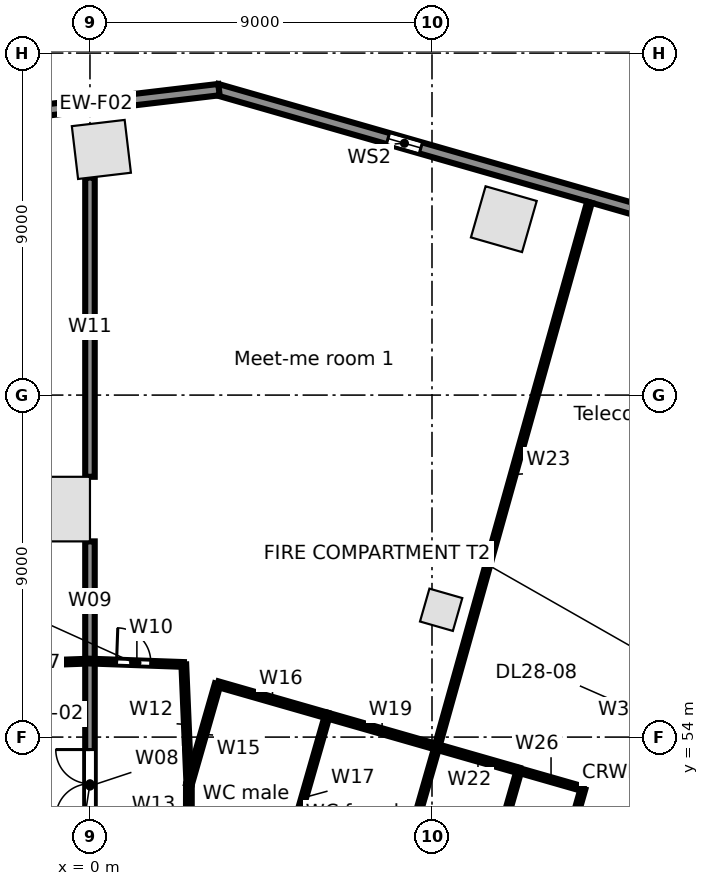
"""IFC4 building model, lengths in metres.
Left out: names, types, materials, properties, quantities, classifications, styles, units other than length and angle.
Written with IfcOpenShell. Run it as: python <this file> out.ifc"""

import sys

from ifc_helpers import new_model, si_unit, direction, frame, frame_2d, origin, origin_2d, place, context, subcontext, project, spatial, rectangle, extrude, element, fill, save


model = new_model("IFC4")
c1 = context("Model", 3, precision=1e-05, world=origin(), true_north=direction((0.0, 1.0)))
c2 = subcontext(c1, "Body", "Model", "MODEL_VIEW")
j1 = project(units=[si_unit("LENGTHUNIT", "METRE"), si_unit("PLANEANGLEUNIT", "RADIAN")], contexts=[c1])
p1 = place(None, origin())
s1 = spatial("IfcSite", under=j1, at=p1, CompositionType="ELEMENT")
p2 = place(p1, origin())
s2 = spatial("IfcBuilding", under=s1, at=p2, CompositionType="ELEMENT")
p3 = place(p2, frame((0.0, 0.0, 136.7)))
s3 = spatial("IfcBuildingStorey", under=s2, at=p3, CompositionType="ELEMENT", Elevation=136.7)
for number, where, z_axis, x_axis in (
    (1, (10.89, 67.629, 0.0), (0.0, 0.0, 1.0), (-0.961, 0.276, 0.0)),
    (2, (0.3, 69.464, 0.0), (0.0, 0.0, 1.0), (-0.993, -0.118, 0.0)),
):
    element("IfcColumn", number, at=place(p3, frame(where, z_axis=z_axis, x_axis=x_axis)), inside=s3, PredefinedType="COLUMN", context=c2, shape_type="SweptSolid", body=[
        extrude(rectangle(XDim=1.4, YDim=1.4, at=origin_2d()), origin(), (0.0, 0.0, 1.0), 4.4),
    ])
p4 = place(p3, frame((-0.85, 60.0, 0.0), z_axis=(0.0, 0.0, 1.0), x_axis=(0.0, 1.0, 0.0)))
e3 = element("IfcColumn", 3, at=p4, inside=s3, PredefinedType="COLUMN", context=c2, shape_type="SweptSolid", body=[
    extrude(rectangle(XDim=1.7, YDim=1.7, at=origin_2d()), origin(), (0.0, 0.0, 1.0), 4.4),
])
p5 = place(p3, frame((9.241, 57.35, 0.0), z_axis=(0.0, 0.0, 1.0), x_axis=(0.961261695938, -0.275637355817, 0.0)))
e4 = element("IfcColumn", 4, at=p5, inside=s3, PredefinedType="COLUMN", context=c2, shape_type="SweptSolid", body=[
    extrude(rectangle(XDim=0.9, YDim=0.9, at=origin_2d()), origin(), (0.0, 0.0, 1.0), 4.4),
])
p6 = place(p3, frame((3.335, 71.044, 0.0), z_axis=(0.0, 0.0, 1.0), x_axis=(0.961260130989, -0.275642813387, 0.0)))
e5 = element("IfcWall", 5, at=p6, inside=s3, PredefinedType="STANDARD", context=c2, shape_type="SweptSolid", body=[
    extrude(rectangle(XDim=32.741, YDim=0.3, at=frame_2d((16.371, 0.0))), origin(), (0.0, 0.0, 1.0), 4.08),
])
p7 = place(p6, frame((29.207, 0.0, 0.6)))
e6 = element("IfcOpeningElement", 6, at=p7, cuts=e5, PredefinedType="OPENING", context=c2, shape_type="SweptSolid", body=[
    extrude(rectangle(XDim=0.9, YDim=2.8, at=frame_2d((0.45, 1.4))), frame((0.0, 0.16, 0.0), z_axis=(0.0, -1.0, 0.0), x_axis=(1.0, 0.0, 0.0)), (0.0, 0.0, 1.0), 0.32),
])
p8 = place(p6, frame((21.034, 0.0, 0.6)))
e7 = element("IfcOpeningElement", 7, at=p8, cuts=e5, PredefinedType="OPENING", context=c2, shape_type="SweptSolid", body=[
    extrude(rectangle(XDim=0.9, YDim=2.8, at=frame_2d((0.45, 1.4))), frame((0.0, 0.16, 0.0), z_axis=(0.0, -1.0, 0.0), x_axis=(1.0, 0.0, 0.0)), (0.0, 0.0, 1.0), 0.32),
])
p9 = place(p6, frame((12.861, 0.0, 0.6)))
e8 = element("IfcOpeningElement", 8, at=p9, cuts=e5, PredefinedType="OPENING", context=c2, shape_type="SweptSolid", body=[
    extrude(rectangle(XDim=0.9, YDim=2.8, at=frame_2d((0.45, 1.4))), frame((0.0, 0.16, 0.0), z_axis=(0.0, -1.0, 0.0), x_axis=(1.0, 0.0, 0.0)), (0.0, 0.0, 1.0), 0.32),
])
p10 = place(p6, frame((4.688, 0.0, 0.6)))
e9 = element("IfcOpeningElement", 9, at=p10, cuts=e5, PredefinedType="OPENING", context=c2, shape_type="SweptSolid", body=[
    extrude(rectangle(XDim=0.9, YDim=2.8, at=frame_2d((0.45, 1.4))), frame((0.0, 0.16, 0.0), z_axis=(0.0, -1.0, 0.0), x_axis=(1.0, 0.0, 0.0)), (0.0, 0.0, 1.0), 0.32),
])
p11 = place(p3, frame((-3.076, 70.273, 0.0), z_axis=(0.0, 0.0, 1.0), x_axis=(0.993067743007, 0.117543429416, 0.0)))
e10 = element("IfcWall", 10, at=p11, inside=s3, PredefinedType="STANDARD", context=c2, shape_type="SweptSolid", body=[
    extrude(rectangle(XDim=6.516, YDim=0.3, at=frame_2d((3.258, 0.0))), origin(), (0.0, 0.0, 1.0), 4.08),
])
p12 = place(p3, frame((-2.67, 55.904, 0.0), z_axis=(0.0, 0.0, 1.0), x_axis=(0.999354913865, 0.03591317494, 0.0)))
e11 = element("IfcWall", 11, at=p12, inside=s3, PredefinedType="PARTITIONING", context=c2, shape_type="SweptSolid", body=[
    extrude(rectangle(XDim=2.672, YDim=0.125, at=frame_2d((1.336, 0.0))), origin(), (0.0, 0.0, 1.0), 3.142),
])
p13 = place(p3, frame((0.0, 49.422, 0.0), z_axis=(0.0, 0.0, 1.0), x_axis=(0.0, 1.0, 0.0)))
e12 = element("IfcWall", 12, at=p13, inside=s3, PredefinedType="PARTITIONING", context=c2, shape_type="SweptSolid", body=[
    extrude(rectangle(XDim=6.578, YDim=0.25, at=frame_2d((3.289, 0.0))), origin(), (0.0, 0.0, 1.0), 4.08),
])
p14 = place(p13, frame((2.45, 0.0, 0.0)))
e13 = element("IfcOpeningElement", 13, at=p14, cuts=e12, PredefinedType="OPENING", context=c2, shape_type="SweptSolid", body=[
    extrude(rectangle(XDim=1.8, YDim=2.1, at=frame_2d((0.9, 1.05))), frame((0.0, 0.135, 0.0), z_axis=(0.0, -1.0, 0.0), x_axis=(1.0, 0.0, 0.0)), (0.0, 0.0, 1.0), 0.27),
])
p15 = place(p3, frame((0.0, 56.0, 0.0), z_axis=(0.0, 0.0, 1.0), x_axis=(0.0, 1.0, 0.0)))
e14 = element("IfcWall", 14, at=p15, inside=s3, PredefinedType="PARTITIONING", context=c2, shape_type="SweptSolid", body=[
    extrude(rectangle(XDim=3.15, YDim=0.25, at=frame_2d((1.575, 0.0))), origin(), (0.0, 0.0, 1.0), 4.08),
])
p16 = place(p3, frame((0.0, 56.0, 0.0), z_axis=(0.0, 0.0, 1.0), x_axis=(0.999349313684, -0.036068673934, 0.0)))
e15 = element("IfcWall", 15, at=p16, inside=s3, PredefinedType="PARTITIONING", context=c2, shape_type="SweptSolid", body=[
    extrude(rectangle(XDim=2.471, YDim=0.125, at=frame_2d((1.235, 0.0))), origin(), (0.0, 0.0, 1.0), 4.08),
])
p17 = place(p16, frame((0.7, 0.0, 0.0)))
e16 = element("IfcOpeningElement", 16, at=p17, cuts=e15, PredefinedType="OPENING", context=c2, shape_type="SweptSolid", body=[
    extrude(rectangle(XDim=0.9, YDim=2.1, at=frame_2d((0.45, 1.05))), frame((0.0, 0.073, 0.0), z_axis=(0.0, -1.0, 0.0), x_axis=(1.0, 0.0, 0.0)), (0.0, 0.0, 1.0), 0.145),
])
p18 = place(p3, frame((0.0, 60.85, 0.0), z_axis=(0.0, 0.0, 1.0), x_axis=(0.0, 1.0, 0.0)))
e17 = element("IfcWall", 17, at=p18, inside=s3, PredefinedType="PARTITIONING", context=c2, shape_type="SweptSolid", body=[
    extrude(rectangle(XDim=7.874, YDim=0.25, at=frame_2d((3.937, 0.0))), origin(), (0.0, 0.0, 1.0), 3.352),
])
p19 = place(p3, frame((2.469, 55.911, 0.0), z_axis=(0.0, 0.0, 1.0), x_axis=(0.042391721597, -0.99910106693, 0.0)))
e18 = element("IfcWall", 18, at=p19, inside=s3, PredefinedType="PARTITIONING", context=c2, shape_type="SweptSolid", body=[
    extrude(rectangle(XDim=3.162, YDim=0.125, at=frame_2d((1.581, 0.0))), origin(), (0.0, 0.0, 1.0), 4.08),
])
p20 = place(p3, frame((2.601, 50.932, 0.0), z_axis=(0.0, 0.0, 1.0), x_axis=(0.001073104681, 0.999999424223, 0.0)))
e19 = element("IfcWall", 19, at=p20, inside=s3, PredefinedType="PARTITIONING", context=c2, shape_type="SweptSolid", body=[
    extrude(rectangle(XDim=1.82, YDim=0.15, at=frame_2d((0.91, 0.0))), origin(), (0.0, 0.0, 1.0), 4.08),
])
p21 = place(p3, frame((2.603, 52.752, 0.0), z_axis=(0.0, 0.0, 1.0), x_axis=(0.27569433145, 0.961245356611, 0.0)))
e20 = element("IfcWall", 20, at=p21, inside=s3, PredefinedType="PARTITIONING", context=c2, shape_type="SweptSolid", body=[
    extrude(rectangle(XDim=2.75, YDim=0.15, at=frame_2d((1.375, 0.0))), origin(), (0.0, 0.0, 1.0), 4.08),
])
p22 = place(p3, frame((3.361, 55.395, 0.0), z_axis=(0.0, 0.0, 1.0), x_axis=(0.961268664977, -0.27561305073, 0.0)))
e21 = element("IfcWall", 21, at=p22, inside=s3, PredefinedType="PARTITIONING", context=c2, shape_type="SweptSolid", body=[
    extrude(rectangle(XDim=3.0, YDim=0.15, at=frame_2d((1.5, 0.0))), origin(), (0.0, 0.0, 1.0), 4.08),
])
p23 = place(p3, frame((5.004, 50.243, 0.0), z_axis=(0.0, 0.0, 1.0), x_axis=(0.275838825927, 0.961203902464, 0.0)))
e22 = element("IfcWall", 22, at=p23, inside=s3, PredefinedType="PARTITIONING", context=c2, shape_type="SweptSolid", body=[
    extrude(rectangle(XDim=4.5, YDim=0.125, at=frame_2d((2.25, 0.0))), origin(), (0.0, 0.0, 1.0), 4.08),
])
p24 = place(p3, frame((6.245, 54.568, 0.0), z_axis=(0.0, 0.0, 1.0), x_axis=(0.961240918172, -0.275709806194, 0.0)))
e23 = element("IfcWall", 23, at=p24, inside=s3, PredefinedType="PARTITIONING", context=c2, shape_type="SweptSolid", body=[
    extrude(rectangle(XDim=3.0, YDim=0.15, at=frame_2d((1.5, 0.0))), origin(), (0.0, 0.0, 1.0), 3.16),
])
p25 = place(p3, frame((7.888, 49.416, 0.0), z_axis=(0.0, 0.0, 1.0), x_axis=(0.275803080638, 0.96121415965, 0.0)))
e24 = element("IfcWall", 24, at=p25, inside=s3, PredefinedType="PARTITIONING", context=c2, shape_type="SweptSolid", body=[
    extrude(rectangle(XDim=4.5, YDim=0.125, at=frame_2d((2.25, 0.0))), origin(), (0.0, 0.0, 1.0), 3.16),
])
p26 = place(p3, frame((9.129, 53.741, 0.0), z_axis=(0.0, 0.0, 1.0), x_axis=(0.961273691875, -0.275595517578, 0.0)))
e25 = element("IfcWall", 25, at=p26, inside=s3, PredefinedType="PARTITIONING", context=c2, shape_type="SweptSolid", body=[
    extrude(rectangle(XDim=2.249, YDim=0.15, at=frame_2d((1.125, 0.0))), origin(), (0.0, 0.0, 1.0), 3.142),
])
p27 = place(p3, frame((9.129, 53.741, 0.0), z_axis=(0.0, 0.0, 1.0), x_axis=(0.269791738843, 0.962918697322, 0.0)))
e26 = element("IfcWall", 26, at=p27, inside=s3, PredefinedType="PARTITIONING", context=c2, shape_type="SweptSolid", body=[
    extrude(rectangle(XDim=14.886, YDim=0.125, at=frame_2d((7.443, 0.0))), origin(), (0.0, 0.0, 1.0), 3.142),
])
p28 = place(p3, frame((10.051, 48.795, 0.0), z_axis=(0.0, 0.0, 1.0), x_axis=(0.275530671241, 0.961292280841, 0.0)))
e27 = element("IfcWall", 27, at=p28, inside=s3, PredefinedType="PARTITIONING", context=c2, shape_type="SweptSolid", body=[
    extrude(rectangle(XDim=4.5, YDim=0.125, at=frame_2d((2.25, 0.0))), origin(), (0.0, 0.0, 1.0), 4.08),
])
p29 = place(p3, frame((11.291, 53.121, 0.0), z_axis=(0.0, 0.0, 1.0), x_axis=(0.961329010357, -0.275402494264, 0.0)))
e28 = element("IfcWall", 28, at=p29, inside=s3, PredefinedType="PARTITIONING", context=c2, shape_type="SweptSolid", body=[
    extrude(rectangle(XDim=1.751, YDim=0.125, at=frame_2d((0.875, 0.0))), origin(), (0.0, 0.0, 1.0), 4.08),
])
p30 = place(p3, frame((11.733, 48.313, 0.0), z_axis=(0.0, 0.0, 1.0), x_axis=(0.275795676316, 0.961216284155, 0.0)))
e29 = element("IfcWall", 29, at=p30, inside=s3, PredefinedType="PARTITIONING", context=c2, shape_type="SweptSolid", body=[
    extrude(rectangle(XDim=4.5, YDim=0.125, at=frame_2d((2.25, 0.0))), origin(), (0.0, 0.0, 1.0), 4.08),
])
p31 = place(p10, origin())
e30 = element("IfcWindow", 30, at=p31, inside=s3, PartitioningType="SINGLE_PANEL", PredefinedType="WINDOW", context=c2, shape_type="SweptSolid", body=[
    extrude(rectangle(XDim=0.9, YDim=2.8, at=frame_2d((0.45, 1.4))), frame((0.0, 0.03, 0.0), z_axis=(0.0, -1.0, 0.0), x_axis=(1.0, 0.0, 0.0)), (0.0, 0.0, 1.0), 0.06),
])
fill(e9, e30)
p32 = place(p17, origin())
e31 = element("IfcDoor", 31, at=p32, inside=s3, OperationType="SINGLE_SWING_LEFT", PredefinedType="DOOR", context=c2, shape_type="SweptSolid", body=[
    extrude(rectangle(XDim=0.9, YDim=2.1, at=frame_2d((0.45, 1.05))), frame((0.0, 0.025, 0.0), z_axis=(0.0, -1.0, 0.0), x_axis=(1.0, 0.0, 0.0)), (0.0, 0.0, 1.0), 0.05),
])
fill(e16, e31)
p33 = place(p14, origin())
e32 = element("IfcDoor", 32, at=p33, inside=s3, OperationType="DOUBLE_DOOR_SINGLE_SWING", PredefinedType="DOOR", context=c2, shape_type="SweptSolid", body=[
    extrude(rectangle(XDim=1.8, YDim=2.1, at=frame_2d((0.9, 1.05))), frame((0.0, 0.025, 0.0), z_axis=(0.0, -1.0, 0.0), x_axis=(1.0, 0.0, 0.0)), (0.0, 0.0, 1.0), 0.05),
])
fill(e13, e32)
save(model, sys.argv[1])
